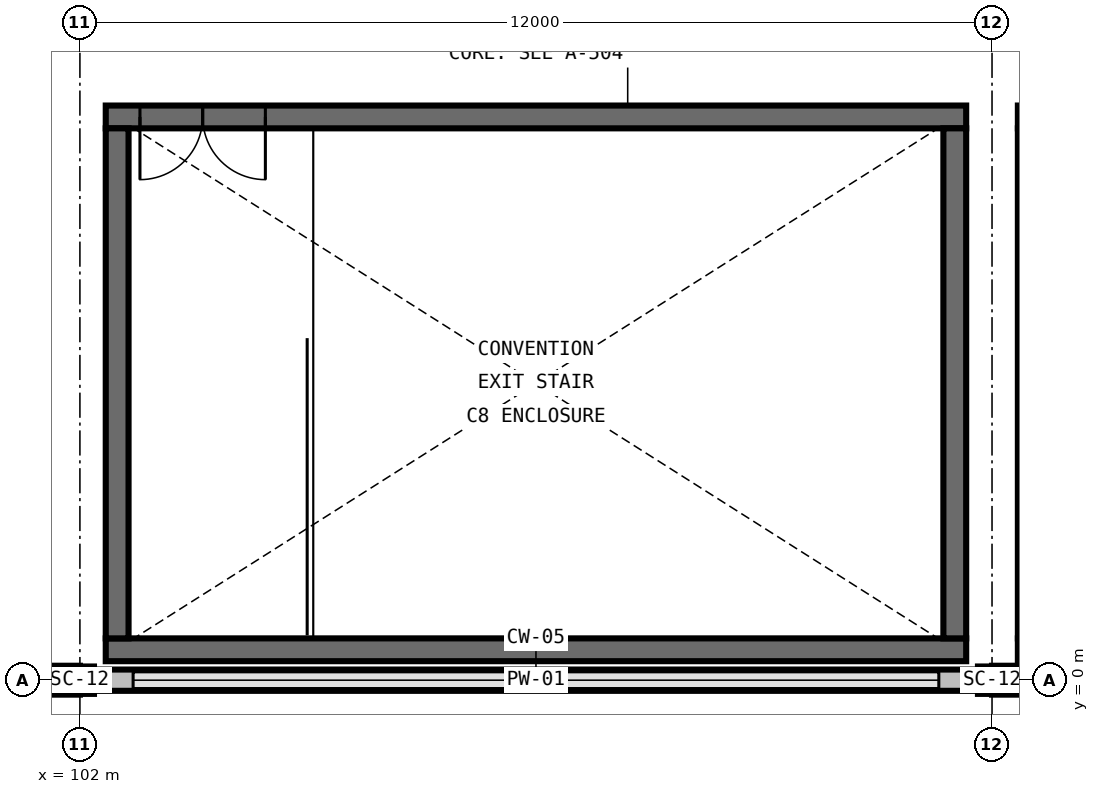
"""IFC4 building model, lengths in metres.
Left out: names, types, materials, properties, quantities, classifications, styles, units other than length and angle.
Written with IfcOpenShell. Run it as: python <this file> out.ifc"""

import sys

from ifc_helpers import new_model, si_unit, direction, frame, frame_2d, origin, origin_2d, place, context, subcontext, project, spatial, rectangle, i_section, extrude, element, fill, save


model = new_model("IFC4")
c1 = context("Model", 3, precision=1e-05, world=origin(), true_north=direction((0.0, 1.0)))
c2 = subcontext(c1, "Body", "Model", "MODEL_VIEW")
j1 = project(units=[si_unit("LENGTHUNIT", "METRE"), si_unit("PLANEANGLEUNIT", "RADIAN")], contexts=[c1])
p1 = place(None, origin())
s1 = spatial("IfcSite", under=j1, at=p1, CompositionType="ELEMENT")
p2 = place(p1, origin())
s2 = spatial("IfcBuilding", under=s1, at=p2, CompositionType="ELEMENT")
p3 = place(p2, frame((0.0, 0.0, 23.4)))
s3 = spatial("IfcBuildingStorey", under=s2, at=p3, CompositionType="ELEMENT", Elevation=23.4)
for number, where, z_axis, x_axis in (
    (1, (102.0, 0.0, 0.0), (0.0, 0.0, 1.0), (1.0, 0.0, 0.0)),
    (2, (114.0, 0.0, 0.0), (0.0, 0.0, 1.0), (1.0, 0.0, 0.0)),
):
    element("IfcColumn", number, at=place(p3, frame(where, z_axis=z_axis, x_axis=x_axis)), inside=s3, PredefinedType="COLUMN", context=c2, shape_type="SweptSolid", body=[
        extrude(i_section(OverallWidth=0.37, OverallDepth=0.36, WebThickness=0.012, FlangeThickness=0.02, FilletRadius=0.031, at=origin_2d()), origin(), (0.0, 0.0, 1.0), 3.85),
    ])
p4 = place(p3, frame((113.66, 0.4, 0.0), z_axis=(0.0, 0.0, 1.0), x_axis=(-1.0, 0.0, 0.0)))
e3 = element("IfcWall", 3, at=p4, inside=s3, PredefinedType="SHEAR", context=c2, shape_type="SweptSolid", body=[
    extrude(rectangle(XDim=11.32, YDim=0.3, at=frame_2d((5.66, 0.0))), origin(), (0.0, 0.0, 1.0), 3.85),
])
p5 = place(p3, frame((113.66, 7.41, 0.0), z_axis=(0.0, 0.0, 1.0), x_axis=(-1.0, 0.0, 0.0)))
e4 = element("IfcWall", 4, at=p5, inside=s3, PredefinedType="SHEAR", context=c2, shape_type="SweptSolid", body=[
    extrude(rectangle(XDim=11.32, YDim=0.3, at=frame_2d((5.66, 0.0))), origin(), (0.0, 0.0, 1.0), 3.85),
])
p6 = place(p5, frame((9.22, 0.0, 0.0)))
e5 = element("IfcOpeningElement", 5, at=p6, cuts=e4, PredefinedType="OPENING", context=c2, shape_type="SweptSolid", body=[
    extrude(rectangle(XDim=1.65, YDim=2.25, at=frame_2d((0.825, 1.125))), frame((0.0, 0.165, 0.0), z_axis=(0.0, -1.0, 0.0), x_axis=(1.0, 0.0, 0.0)), (0.0, 0.0, 1.0), 0.33),
])
for number, where, z_axis, x_axis in (
    (6, (102.49, 7.26, 0.0), (0.0, 0.0, 1.0), (0.0, -1.0, 0.0)),
    (7, (113.51, 0.55, 0.0), (0.0, 0.0, 1.0), (0.0, 1.0, 0.0)),
):
    element("IfcWall", number, at=place(p3, frame(where, z_axis=z_axis, x_axis=x_axis)), inside=s3, PredefinedType="SHEAR", context=c2, shape_type="SweptSolid", body=[
        extrude(rectangle(XDim=6.71, YDim=0.3, at=frame_2d((3.355, 0.0))), origin(), (0.0, 0.0, 1.0), 3.85),
    ])
p7 = place(p3, frame((125.66, 0.4, 0.0), z_axis=(0.0, 0.0, 1.0), x_axis=(-1.0, 0.0, 0.0)))
e8 = element("IfcWall", 8, at=p7, inside=s3, PredefinedType="SHEAR", context=c2, shape_type="SweptSolid", body=[
    extrude(rectangle(XDim=11.32, YDim=0.3, at=frame_2d((5.66, 0.0))), origin(), (0.0, 0.0, 1.0), 3.85),
])
p8 = place(p3, frame((125.66, 7.41, 0.0), z_axis=(0.0, 0.0, 1.0), x_axis=(-1.0, 0.0, 0.0)))
e9 = element("IfcWall", 9, at=p8, inside=s3, PredefinedType="SHEAR", context=c2, shape_type="SweptSolid", body=[
    extrude(rectangle(XDim=11.32, YDim=0.3, at=frame_2d((5.66, 0.0))), origin(), (0.0, 0.0, 1.0), 3.85),
])
p9 = place(p8, frame((9.22, 0.0, 0.0)))
e10 = element("IfcOpeningElement", 10, at=p9, cuts=e9, PredefinedType="OPENING", context=c2, shape_type="SweptSolid", body=[
    extrude(rectangle(XDim=1.65, YDim=2.25, at=frame_2d((0.825, 1.125))), frame((0.0, 0.165, 0.0), z_axis=(0.0, -1.0, 0.0), x_axis=(1.0, 0.0, 0.0)), (0.0, 0.0, 1.0), 0.33),
])
p10 = place(p3, frame((114.49, 7.26, 0.0), z_axis=(0.0, 0.0, 1.0), x_axis=(0.0, -1.0, 0.0)))
e11 = element("IfcWall", 11, at=p10, inside=s3, PredefinedType="SHEAR", context=c2, shape_type="SweptSolid", body=[
    extrude(rectangle(XDim=6.71, YDim=0.3, at=frame_2d((3.355, 0.0))), origin(), (0.0, 0.0, 1.0), 3.85),
])
p11 = place(p3, frame((96.0, 0.0, 0.0), z_axis=(0.0, 0.0, 1.0), x_axis=(1.0, 0.0, 0.0)))
e12 = element("IfcWall", 12, at=p11, inside=s3, PredefinedType="STANDARD", context=c2, shape_type="SweptSolid", body=[
    extrude(rectangle(XDim=6.0, YDim=0.38, at=frame_2d((3.0, 0.0))), origin(), (0.0, 0.0, 1.0), 2.626),
])
p12 = place(p3, frame((102.0, 0.0, 0.0), z_axis=(0.0, 0.0, 1.0), x_axis=(1.0, 0.0, 0.0)))
e13 = element("IfcWall", 13, at=p12, inside=s3, PredefinedType="PARAPET", context=c2, shape_type="SweptSolid", body=[
    extrude(rectangle(XDim=12.0, YDim=0.28, at=frame_2d((6.0, 0.0))), origin(), (0.0, 0.0, 1.0), 0.2),
])
p13 = place(p3, frame((114.0, 0.0, 0.0), z_axis=(0.0, 0.0, 1.0), x_axis=(1.0, 0.0, 0.0)))
e14 = element("IfcWall", 14, at=p13, inside=s3, PredefinedType="STANDARD", context=c2, shape_type="SweptSolid", body=[
    extrude(rectangle(XDim=12.0, YDim=0.38, at=frame_2d((6.0, 0.0))), origin(), (0.0, 0.0, 1.0), 2.626),
])
p14 = place(p13, frame((1.5, 0.0, 0.85)))
e15 = element("IfcOpeningElement", 15, at=p14, cuts=e14, PredefinedType="OPENING", context=c2, shape_type="SweptSolid", body=[
    extrude(rectangle(XDim=2.0, YDim=1.56, at=frame_2d((1.0, 0.78))), frame((0.0, 0.205, 0.0), z_axis=(0.0, -1.0, 0.0), x_axis=(1.0, 0.0, 0.0)), (0.0, 0.0, 1.0), 0.41),
])
p15 = place(p3, frame((0.0, 0.14, 3.85), z_axis=(0.0, 0.0, 1.0), x_axis=(1.0, 0.0, 0.0)))
e16 = element("IfcWall", 16, at=p15, inside=s3, PredefinedType="PARAPET", context=c2, shape_type="SweptSolid", body=[
    extrude(rectangle(XDim=174.0, YDim=0.28, at=frame_2d((87.0, 0.0))), origin(), (0.0, 0.0, 1.0), 1.2),
])
p16 = place(p6, origin())
e17 = element("IfcDoor", 17, at=p16, inside=s3, OperationType="DOUBLE_DOOR_SINGLE_SWING", PredefinedType="DOOR", context=c2, shape_type="SweptSolid", body=[
    extrude(rectangle(XDim=1.65, YDim=2.25, at=frame_2d((0.825, 1.125))), frame((0.0, 0.025, 0.0), z_axis=(0.0, -1.0, 0.0), x_axis=(1.0, 0.0, 0.0)), (0.0, 0.0, 1.0), 0.05),
])
fill(e5, e17)
save(model, sys.argv[1])
